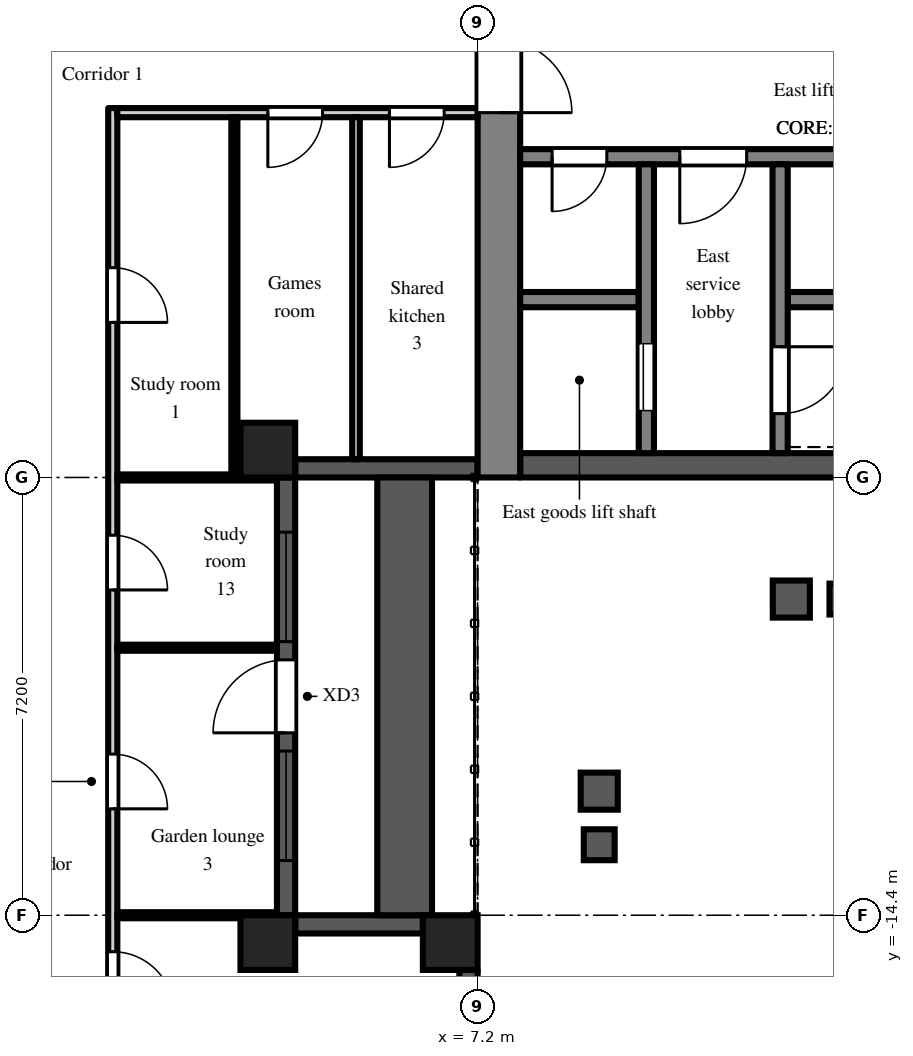
"""IFC4 building model, lengths in metres.
Left out: names, types, materials, properties, quantities, classifications, styles, units other than length and angle.
Written with IfcOpenShell. Run it as: python <this file> out.ifc"""

import sys

from ifc_helpers import new_model, si_unit, direction, frame, frame_2d, origin, origin_2d, place, context, subcontext, project, spatial, rectangle, extrude, element, fill, save


model = new_model("IFC4")
c1 = context("Model", 3, precision=1e-05, world=origin(), true_north=direction((0.0, 1.0)))
c2 = subcontext(c1, "Body", "Model", "MODEL_VIEW")
j1 = project(units=[si_unit("LENGTHUNIT", "METRE"), si_unit("PLANEANGLEUNIT", "RADIAN")], contexts=[c1])
p1 = place(None, origin())
s1 = spatial("IfcSite", under=j1, at=p1, CompositionType="ELEMENT")
p2 = place(p1, origin())
s2 = spatial("IfcBuilding", under=s1, at=p2, CompositionType="ELEMENT")
p3 = place(p2, frame((0.0, 0.0, 188.7)))
s3 = spatial("IfcBuildingStorey", under=s2, at=p3, CompositionType="ELEMENT", Elevation=188.7)
for number, where, z_axis, x_axis in (
    (1, (3.75, -14.85, 0.0), (0.0, 0.0, 1.0), (1.0, 0.0, 0.0)),
    (2, (3.75, -6.75, 0.0), (0.0, 0.0, 1.0), (1.0, 0.0, 0.0)),
    (3, (6.75, -14.85, 0.0), (0.0, 0.0, 1.0), (1.0, 0.0, 0.0)),
):
    element("IfcColumn", number, at=place(p3, frame(where, z_axis=z_axis, x_axis=x_axis)), inside=s3, PredefinedType="COLUMN", context=c2, shape_type="SweptSolid", body=[
        extrude(rectangle(XDim=0.9, YDim=0.9, at=origin_2d()), origin(), (0.0, 0.0, 1.0), 3.0),
    ])
p4 = place(p3, frame((7.05, -17.1, 0.0), z_axis=(0.0, 0.0, 1.0), x_axis=(0.0, 1.0, 0.0)))
e4 = element("IfcWall", 4, at=p4, inside=s3, PredefinedType="SOLIDWALL", context=c2, shape_type="SweptSolid", body=[
    extrude(rectangle(XDim=1.8, YDim=0.3, at=frame_2d((0.9, 0.0))), origin(), (0.0, 0.0, 1.0), 2.2),
])
p5 = place(p4, frame((0.3, 0.0, 0.2)))
e5 = element("IfcOpeningElement", 5, at=p5, cuts=e4, PredefinedType="OPENING", context=c2, shape_type="SweptSolid", body=[
    extrude(rectangle(XDim=1.2, YDim=1.85, at=frame_2d((0.6, 0.925))), frame((0.0, 0.16, 0.0), z_axis=(0.0, -1.0, 0.0), x_axis=(1.0, 0.0, 0.0)), (0.0, 0.0, 1.0), 0.32),
])
p6 = place(p3, frame((6.3, -14.55, 0.0), z_axis=(0.0, 0.0, 1.0), x_axis=(-1.0, 0.0, 0.0)))
e6 = element("IfcWall", 6, at=p6, inside=s3, PredefinedType="SOLIDWALL", context=c2, shape_type="SweptSolid", body=[
    extrude(rectangle(XDim=2.1, YDim=0.3, at=frame_2d((1.05, 0.0))), origin(), (0.0, 0.0, 1.0), 2.2),
])
p7 = place(p3, frame((4.05, -14.4, 0.0), z_axis=(0.0, 0.0, 1.0), x_axis=(0.0, 1.0, 0.0)))
e7 = element("IfcWall", 7, at=p7, inside=s3, PredefinedType="SOLIDWALL", context=c2, shape_type="SweptSolid", body=[
    extrude(rectangle(XDim=7.2, YDim=0.3, at=frame_2d((3.6, 0.0))), origin(), (0.0, 0.0, 1.0), 2.2),
])
p8 = place(p7, frame((3.0, 0.0, 0.0)))
e8 = element("IfcOpeningElement", 8, at=p8, cuts=e7, PredefinedType="OPENING", context=c2, shape_type="SweptSolid", body=[
    extrude(rectangle(XDim=1.2, YDim=2.05, at=frame_2d((0.6, 1.025))), frame((0.0, 0.16, 0.0), z_axis=(0.0, -1.0, 0.0), x_axis=(1.0, 0.0, 0.0)), (0.0, 0.0, 1.0), 0.32),
])
p9 = place(p7, frame((0.9, 0.0, 0.2)))
e9 = element("IfcOpeningElement", 9, at=p9, cuts=e7, PredefinedType="OPENING", context=c2, shape_type="SweptSolid", body=[
    extrude(rectangle(XDim=1.8, YDim=1.85, at=frame_2d((0.9, 0.925))), frame((0.0, 0.16, 0.0), z_axis=(0.0, -1.0, 0.0), x_axis=(1.0, 0.0, 0.0)), (0.0, 0.0, 1.0), 0.32),
])
p10 = place(p7, frame((4.5, 0.0, 0.2)))
e10 = element("IfcOpeningElement", 10, at=p10, cuts=e7, PredefinedType="OPENING", context=c2, shape_type="SweptSolid", body=[
    extrude(rectangle(XDim=1.8, YDim=1.85, at=frame_2d((0.9, 0.925))), frame((0.0, 0.16, 0.0), z_axis=(0.0, -1.0, 0.0), x_axis=(1.0, 0.0, 0.0)), (0.0, 0.0, 1.0), 0.32),
])
p11 = place(p3, frame((4.2, -7.05, 0.0), z_axis=(0.0, 0.0, 1.0), x_axis=(1.0, 0.0, 0.0)))
e11 = element("IfcWall", 11, at=p11, inside=s3, PredefinedType="SOLIDWALL", context=c2, shape_type="SweptSolid", body=[
    extrude(rectangle(XDim=3.0, YDim=0.3, at=frame_2d((1.5, 0.0))), origin(), (0.0, 0.0, 1.0), 2.2),
])
p12 = place(p3, frame((6.0, -14.4, 0.0), z_axis=(0.0, 0.0, 1.0), x_axis=(0.0, 1.0, 0.0)))
e12 = element("IfcWall", 12, at=p12, inside=s3, PredefinedType="PARAPET", context=c2, shape_type="SweptSolid", body=[
    extrude(rectangle(XDim=7.2, YDim=0.9, at=frame_2d((3.6, 0.0))), origin(), (0.0, 0.0, 1.0), 0.8),
])
p13 = place(p3, frame((7.55, -7.2, 0.0), z_axis=(0.0, 0.0, 1.0), x_axis=(0.0, 1.0, 0.0)))
e13 = element("IfcWall", 13, at=p13, inside=s3, PredefinedType="SHEAR", context=c2, shape_type="SweptSolid", body=[
    extrude(rectangle(XDim=14.4, YDim=0.7, at=frame_2d((7.2, 0.0))), origin(), (0.0, 0.0, 1.0), 2.6),
])
p14 = place(p13, frame((6.0, 0.0, 0.0)))
e14 = element("IfcOpeningElement", 14, at=p14, cuts=e13, PredefinedType="OPENING", context=c2, shape_type="SweptSolid", body=[
    extrude(rectangle(XDim=2.4, YDim=2.2, at=frame_2d((1.2, 1.1))), frame((0.0, 0.36, 0.0), z_axis=(0.0, -1.0, 0.0), x_axis=(1.0, 0.0, 0.0)), (0.0, 0.0, 1.0), 0.72),
])
p15 = place(p3, frame((7.9, -7.0, 0.0), z_axis=(0.0, 0.0, 1.0), x_axis=(1.0, 0.0, 0.0)))
e15 = element("IfcWall", 15, at=p15, inside=s3, PredefinedType="SHEAR", context=c2, shape_type="SweptSolid", body=[
    extrude(rectangle(XDim=12.95, YDim=0.4, at=frame_2d((6.475, 0.0))), origin(), (0.0, 0.0, 1.0), 2.6),
])
p16 = place(p3, frame((7.9, -1.925, 0.0), z_axis=(0.0, 0.0, 1.0), x_axis=(1.0, 0.0, 0.0)))
e16 = element("IfcWall", 16, at=p16, inside=s3, PredefinedType="SHEAR", context=c2, shape_type="SweptSolid", body=[
    extrude(rectangle(XDim=12.95, YDim=0.25, at=frame_2d((6.475, 0.0))), origin(), (0.0, 0.0, 1.0), 2.6),
])
p17 = place(p16, frame((0.525, 0.0, 0.0)))
e17 = element("IfcOpeningElement", 17, at=p17, cuts=e16, PredefinedType="OPENING", context=c2, shape_type="SweptSolid", body=[
    extrude(rectangle(XDim=0.9, YDim=2.1, at=frame_2d((0.45, 1.05))), frame((0.0, 0.135, 0.0), z_axis=(0.0, -1.0, 0.0), x_axis=(1.0, 0.0, 0.0)), (0.0, 0.0, 1.0), 0.27),
])
p18 = place(p16, frame((2.625, 0.0, 0.0)))
e18 = element("IfcOpeningElement", 18, at=p18, cuts=e16, PredefinedType="OPENING", context=c2, shape_type="SweptSolid", body=[
    extrude(rectangle(XDim=1.1, YDim=2.1, at=frame_2d((0.55, 1.05))), frame((0.0, 0.135, 0.0), z_axis=(0.0, -1.0, 0.0), x_axis=(1.0, 0.0, 0.0)), (0.0, 0.0, 1.0), 0.27),
])
p19 = place(p16, frame((8.225, 0.0, 0.0)))
e19 = element("IfcOpeningElement", 19, at=p19, cuts=e16, PredefinedType="OPENING", context=c2, shape_type="SweptSolid", body=[
    extrude(rectangle(XDim=0.9, YDim=2.1, at=frame_2d((0.45, 1.05))), frame((0.0, 0.135, 0.0), z_axis=(0.0, -1.0, 0.0), x_axis=(1.0, 0.0, 0.0)), (0.0, 0.0, 1.0), 0.27),
])
p20 = place(p3, frame((7.9, -4.275, 0.0), z_axis=(0.0, 0.0, 1.0), x_axis=(1.0, 0.0, 0.0)))
e20 = element("IfcWall", 20, at=p20, inside=s3, PredefinedType="SHEAR", context=c2, shape_type="SweptSolid", body=[
    extrude(rectangle(XDim=1.95, YDim=0.25, at=frame_2d((0.975, 0.0))), origin(), (0.0, 0.0, 1.0), 2.6),
])
p21 = place(p3, frame((12.3, -4.275, 0.0), z_axis=(0.0, 0.0, 1.0), x_axis=(1.0, 0.0, 0.0)))
e21 = element("IfcWall", 21, at=p21, inside=s3, PredefinedType="SHEAR", context=c2, shape_type="SweptSolid", body=[
    extrude(rectangle(XDim=8.55, YDim=0.25, at=frame_2d((4.275, 0.0))), origin(), (0.0, 0.0, 1.0), 2.6),
])
p22 = place(p3, frame((9.975, -2.05, 0.0), z_axis=(0.0, 0.0, 1.0), x_axis=(0.0, -1.0, 0.0)))
e22 = element("IfcWall", 22, at=p22, inside=s3, PredefinedType="SHEAR", context=c2, shape_type="SweptSolid", body=[
    extrude(rectangle(XDim=4.75, YDim=0.25, at=frame_2d((2.375, 0.0))), origin(), (0.0, 0.0, 1.0), 2.6),
])
p23 = place(p22, frame((2.95, 0.0, 0.0)))
e23 = element("IfcOpeningElement", 23, at=p23, cuts=e22, PredefinedType="OPENING", context=c2, shape_type="SweptSolid", body=[
    extrude(rectangle(XDim=1.1, YDim=2.1, at=frame_2d((0.55, 1.05))), frame((0.0, 0.135, 0.0), z_axis=(0.0, -1.0, 0.0), x_axis=(1.0, 0.0, 0.0)), (0.0, 0.0, 1.0), 0.27),
])
p24 = place(p3, frame((12.175, -2.05, 0.0), z_axis=(0.0, 0.0, 1.0), x_axis=(0.0, -1.0, 0.0)))
e24 = element("IfcWall", 24, at=p24, inside=s3, PredefinedType="SHEAR", context=c2, shape_type="SweptSolid", body=[
    extrude(rectangle(XDim=4.75, YDim=0.25, at=frame_2d((2.375, 0.0))), origin(), (0.0, 0.0, 1.0), 2.6),
])
p25 = place(p24, frame((3.0, 0.0, 0.0)))
e25 = element("IfcOpeningElement", 25, at=p25, cuts=e24, PredefinedType="OPENING", context=c2, shape_type="SweptSolid", body=[
    extrude(rectangle(XDim=1.1, YDim=2.1, at=frame_2d((0.55, 1.05))), frame((0.0, 0.135, 0.0), z_axis=(0.0, -1.0, 0.0), x_axis=(1.0, 0.0, 0.0)), (0.0, 0.0, 1.0), 0.27),
])
p26 = place(p3, frame((1.2, -19.525, 0.0), z_axis=(0.0, 0.0, 1.0), x_axis=(0.0, 1.0, 0.0)))
e26 = element("IfcWall", 26, at=p26, inside=s3, PredefinedType="PARTITIONING", context=c2, shape_type="SweptSolid", body=[
    extrude(rectangle(XDim=18.4, YDim=0.15, at=frame_2d((9.2, 0.0))), origin(), (0.0, 0.0, 1.0), 2.6),
])
p27 = place(p26, frame((14.875, 0.0, 0.0)))
e27 = element("IfcOpeningElement", 27, at=p27, cuts=e26, PredefinedType="OPENING", context=c2, shape_type="SweptSolid", body=[
    extrude(rectangle(XDim=0.9, YDim=2.1, at=frame_2d((0.45, 1.05))), frame((0.0, 0.085, 0.0), z_axis=(0.0, -1.0, 0.0), x_axis=(1.0, 0.0, 0.0)), (0.0, 0.0, 1.0), 0.17),
])
p28 = place(p26, frame((10.475, 0.0, 0.0)))
e28 = element("IfcOpeningElement", 28, at=p28, cuts=e26, PredefinedType="OPENING", context=c2, shape_type="SweptSolid", body=[
    extrude(rectangle(XDim=0.9, YDim=2.1, at=frame_2d((0.45, 1.05))), frame((0.0, 0.085, 0.0), z_axis=(0.0, -1.0, 0.0), x_axis=(1.0, 0.0, 0.0)), (0.0, 0.0, 1.0), 0.17),
])
p29 = place(p26, frame((6.875, 0.0, 0.0)))
e29 = element("IfcOpeningElement", 29, at=p29, cuts=e26, PredefinedType="OPENING", context=c2, shape_type="SweptSolid", body=[
    extrude(rectangle(XDim=0.9, YDim=2.1, at=frame_2d((0.45, 1.05))), frame((0.0, 0.085, 0.0), z_axis=(0.0, -1.0, 0.0), x_axis=(1.0, 0.0, 0.0)), (0.0, 0.0, 1.0), 0.17),
])
p30 = place(p26, frame((3.525, 0.0, 0.0)))
e30 = element("IfcOpeningElement", 30, at=p30, cuts=e26, PredefinedType="OPENING", context=c2, shape_type="SweptSolid", body=[
    extrude(rectangle(XDim=1.0, YDim=2.1, at=frame_2d((0.5, 1.05))), frame((0.0, 0.085, 0.0), z_axis=(0.0, -1.0, 0.0), x_axis=(1.0, 0.0, 0.0)), (0.0, 0.0, 1.0), 0.17),
])
for number, where, z_axis, x_axis in (
    (31, (1.275, -14.4, 0.0), (0.0, 0.0, 1.0), (1.0, 0.0, 0.0)),
    (32, (1.275, -10.0, 0.0), (0.0, 0.0, 1.0), (1.0, 0.0, 0.0)),
    (33, (1.275, -7.2, 0.0), (0.0, 0.0, 1.0), (1.0, 0.0, 0.0)),
):
    element("IfcWall", number, at=place(p3, frame(where, z_axis=z_axis, x_axis=x_axis)), inside=s3, PredefinedType="PARTITIONING", context=c2, shape_type="SweptSolid", body=[
        extrude(rectangle(XDim=2.625, YDim=0.1, at=frame_2d((1.312, 0.0))), origin(), (0.0, 0.0, 1.0), 2.6),
    ])
p31 = place(p3, frame((1.275, -1.2, 0.0), z_axis=(0.0, 0.0, 1.0), x_axis=(1.0, 0.0, 0.0)))
e34 = element("IfcWall", 34, at=p31, inside=s3, PredefinedType="PARTITIONING", context=c2, shape_type="SweptSolid", body=[
    extrude(rectangle(XDim=5.925, YDim=0.15, at=frame_2d((2.962, 0.0))), origin(), (0.0, 0.0, 1.0), 2.6),
])
p32 = place(p31, frame((2.475, 0.0, 0.0)))
e35 = element("IfcOpeningElement", 35, at=p32, cuts=e34, PredefinedType="OPENING", context=c2, shape_type="SweptSolid", body=[
    extrude(rectangle(XDim=0.9, YDim=2.1, at=frame_2d((0.45, 1.05))), frame((0.0, 0.085, 0.0), z_axis=(0.0, -1.0, 0.0), x_axis=(1.0, 0.0, 0.0)), (0.0, 0.0, 1.0), 0.17),
])
p33 = place(p31, frame((4.475, 0.0, 0.0)))
e36 = element("IfcOpeningElement", 36, at=p33, cuts=e34, PredefinedType="OPENING", context=c2, shape_type="SweptSolid", body=[
    extrude(rectangle(XDim=0.9, YDim=2.1, at=frame_2d((0.45, 1.05))), frame((0.0, 0.085, 0.0), z_axis=(0.0, -1.0, 0.0), x_axis=(1.0, 0.0, 0.0)), (0.0, 0.0, 1.0), 0.17),
])
p34 = place(p3, frame((3.2, -7.15, 0.0), z_axis=(0.0, 0.0, 1.0), x_axis=(0.0, 1.0, 0.0)))
e37 = element("IfcWall", 37, at=p34, inside=s3, PredefinedType="PARTITIONING", context=c2, shape_type="SweptSolid", body=[
    extrude(rectangle(XDim=5.875, YDim=0.1, at=frame_2d((2.938, 0.0))), origin(), (0.0, 0.0, 1.0), 2.6),
])
p35 = place(p3, frame((5.2, -6.9, 0.0), z_axis=(0.0, 0.0, 1.0), x_axis=(0.0, 1.0, 0.0)))
e38 = element("IfcWall", 38, at=p35, inside=s3, PredefinedType="PARTITIONING", context=c2, shape_type="SweptSolid", body=[
    extrude(rectangle(XDim=5.625, YDim=0.125, at=frame_2d((2.812, 0.0))), origin(), (0.0, 0.0, 1.0), 2.6),
])
p36 = place(p8, origin())
e39 = element("IfcDoor", 39, at=p36, inside=s3, OperationType="SINGLE_SWING_LEFT", PredefinedType="DOOR", context=c2, shape_type="SweptSolid", body=[
    extrude(rectangle(XDim=1.2, YDim=2.05, at=frame_2d((0.6, 1.025))), frame((0.0, 0.025, 0.0), z_axis=(0.0, -1.0, 0.0), x_axis=(1.0, 0.0, 0.0)), (0.0, 0.0, 1.0), 0.05),
])
fill(e8, e39)
p37 = place(p9, origin())
e40 = element("IfcWindow", 40, at=p37, inside=s3, PartitioningType="SINGLE_PANEL", PredefinedType="WINDOW", context=c2, shape_type="SweptSolid", body=[
    extrude(rectangle(XDim=1.8, YDim=1.85, at=frame_2d((0.9, 0.925))), frame((0.0, 0.03, 0.0), z_axis=(0.0, -1.0, 0.0), x_axis=(1.0, 0.0, 0.0)), (0.0, 0.0, 1.0), 0.06),
])
fill(e9, e40)
p38 = place(p10, origin())
e41 = element("IfcWindow", 41, at=p38, inside=s3, PartitioningType="SINGLE_PANEL", PredefinedType="WINDOW", context=c2, shape_type="SweptSolid", body=[
    extrude(rectangle(XDim=1.8, YDim=1.85, at=frame_2d((0.9, 0.925))), frame((0.0, 0.03, 0.0), z_axis=(0.0, -1.0, 0.0), x_axis=(1.0, 0.0, 0.0)), (0.0, 0.0, 1.0), 0.06),
])
fill(e10, e41)
p39 = place(p23, origin())
e42 = element("IfcDoor", 42, at=p39, inside=s3, OperationType="SLIDING_TO_LEFT", PredefinedType="DOOR", context=c2, shape_type="SweptSolid", body=[
    extrude(rectangle(XDim=1.1, YDim=2.1, at=frame_2d((0.55, 1.05))), frame((0.0, 0.025, 0.0), z_axis=(0.0, -1.0, 0.0), x_axis=(1.0, 0.0, 0.0)), (0.0, 0.0, 1.0), 0.05),
])
fill(e23, e42)
p40 = place(p25, origin())
e43 = element("IfcDoor", 43, at=p40, inside=s3, OperationType="SINGLE_SWING_LEFT", PredefinedType="DOOR", context=c2, shape_type="SweptSolid", body=[
    extrude(rectangle(XDim=1.1, YDim=2.1, at=frame_2d((0.55, 1.05))), frame((0.0, 0.025, 0.0), z_axis=(0.0, -1.0, 0.0), x_axis=(1.0, 0.0, 0.0)), (0.0, 0.0, 1.0), 0.05),
])
fill(e25, e43)
p41 = place(p17, frame((0.9, 0.0, 0.0), z_axis=(0.0, 0.0, 1.0), x_axis=(-1.0, 0.0, 0.0)))
e44 = element("IfcDoor", 44, at=p41, inside=s3, OperationType="SINGLE_SWING_RIGHT", PredefinedType="DOOR", context=c2, shape_type="SweptSolid", body=[
    extrude(rectangle(XDim=0.9, YDim=2.1, at=frame_2d((0.45, 1.05))), frame((0.0, 0.025, 0.0), z_axis=(0.0, -1.0, 0.0), x_axis=(1.0, 0.0, 0.0)), (0.0, 0.0, 1.0), 0.05),
])
fill(e17, e44)
p42 = place(p18, frame((1.1, 0.0, 0.0), z_axis=(0.0, 0.0, 1.0), x_axis=(-1.0, 0.0, 0.0)))
e45 = element("IfcDoor", 45, at=p42, inside=s3, OperationType="SINGLE_SWING_RIGHT", PredefinedType="DOOR", context=c2, shape_type="SweptSolid", body=[
    extrude(rectangle(XDim=1.1, YDim=2.1, at=frame_2d((0.55, 1.05))), frame((0.0, 0.025, 0.0), z_axis=(0.0, -1.0, 0.0), x_axis=(1.0, 0.0, 0.0)), (0.0, 0.0, 1.0), 0.05),
])
fill(e18, e45)
p43 = place(p14, frame((2.4, 0.0, 0.0), z_axis=(0.0, 0.0, 1.0), x_axis=(-1.0, 0.0, 0.0)))
e46 = element("IfcDoor", 46, at=p43, inside=s3, OperationType="DOUBLE_DOOR_DOUBLE_SWING", PredefinedType="DOOR", context=c2, shape_type="SweptSolid", body=[
    extrude(rectangle(XDim=2.4, YDim=2.2, at=frame_2d((1.2, 1.1))), frame((0.0, 0.025, 0.0), z_axis=(0.0, -1.0, 0.0), x_axis=(1.0, 0.0, 0.0)), (0.0, 0.0, 1.0), 0.05),
])
fill(e14, e46)
p44 = place(p27, frame((0.9, 0.0, 0.0), z_axis=(0.0, 0.0, 1.0), x_axis=(-1.0, 0.0, 0.0)))
e47 = element("IfcDoor", 47, at=p44, inside=s3, OperationType="SINGLE_SWING_RIGHT", PredefinedType="DOOR", context=c2, shape_type="SweptSolid", body=[
    extrude(rectangle(XDim=0.9, YDim=2.1, at=frame_2d((0.45, 1.05))), frame((0.0, 0.025, 0.0), z_axis=(0.0, -1.0, 0.0), x_axis=(1.0, 0.0, 0.0)), (0.0, 0.0, 1.0), 0.05),
])
fill(e27, e47)
p45 = place(p32, frame((0.9, 0.0, 0.0), z_axis=(0.0, 0.0, 1.0), x_axis=(-1.0, 0.0, 0.0)))
e48 = element("IfcDoor", 48, at=p45, inside=s3, OperationType="SINGLE_SWING_RIGHT", PredefinedType="DOOR", context=c2, shape_type="SweptSolid", body=[
    extrude(rectangle(XDim=0.9, YDim=2.1, at=frame_2d((0.45, 1.05))), frame((0.0, 0.025, 0.0), z_axis=(0.0, -1.0, 0.0), x_axis=(1.0, 0.0, 0.0)), (0.0, 0.0, 1.0), 0.05),
])
fill(e35, e48)
p46 = place(p33, frame((0.9, 0.0, 0.0), z_axis=(0.0, 0.0, 1.0), x_axis=(-1.0, 0.0, 0.0)))
e49 = element("IfcDoor", 49, at=p46, inside=s3, OperationType="SINGLE_SWING_RIGHT", PredefinedType="DOOR", context=c2, shape_type="SweptSolid", body=[
    extrude(rectangle(XDim=0.9, YDim=2.1, at=frame_2d((0.45, 1.05))), frame((0.0, 0.025, 0.0), z_axis=(0.0, -1.0, 0.0), x_axis=(1.0, 0.0, 0.0)), (0.0, 0.0, 1.0), 0.05),
])
fill(e36, e49)
p47 = place(p28, frame((0.9, 0.0, 0.0), z_axis=(0.0, 0.0, 1.0), x_axis=(-1.0, 0.0, 0.0)))
e50 = element("IfcDoor", 50, at=p47, inside=s3, OperationType="SINGLE_SWING_RIGHT", PredefinedType="DOOR", context=c2, shape_type="SweptSolid", body=[
    extrude(rectangle(XDim=0.9, YDim=2.1, at=frame_2d((0.45, 1.05))), frame((0.0, 0.025, 0.0), z_axis=(0.0, -1.0, 0.0), x_axis=(1.0, 0.0, 0.0)), (0.0, 0.0, 1.0), 0.05),
])
fill(e28, e50)
p48 = place(p29, frame((0.9, 0.0, 0.0), z_axis=(0.0, 0.0, 1.0), x_axis=(-1.0, 0.0, 0.0)))
e51 = element("IfcDoor", 51, at=p48, inside=s3, OperationType="SINGLE_SWING_RIGHT", PredefinedType="DOOR", context=c2, shape_type="SweptSolid", body=[
    extrude(rectangle(XDim=0.9, YDim=2.1, at=frame_2d((0.45, 1.05))), frame((0.0, 0.025, 0.0), z_axis=(0.0, -1.0, 0.0), x_axis=(1.0, 0.0, 0.0)), (0.0, 0.0, 1.0), 0.05),
])
fill(e29, e51)
p49 = place(p30, frame((1.0, 0.0, 0.0), z_axis=(0.0, 0.0, 1.0), x_axis=(-1.0, 0.0, 0.0)))
e52 = element("IfcDoor", 52, at=p49, inside=s3, OperationType="SINGLE_SWING_RIGHT", PredefinedType="DOOR", context=c2, shape_type="SweptSolid", body=[
    extrude(rectangle(XDim=1.0, YDim=2.1, at=frame_2d((0.5, 1.05))), frame((0.0, 0.025, 0.0), z_axis=(0.0, -1.0, 0.0), x_axis=(1.0, 0.0, 0.0)), (0.0, 0.0, 1.0), 0.05),
])
fill(e30, e52)
save(model, sys.argv[1])
